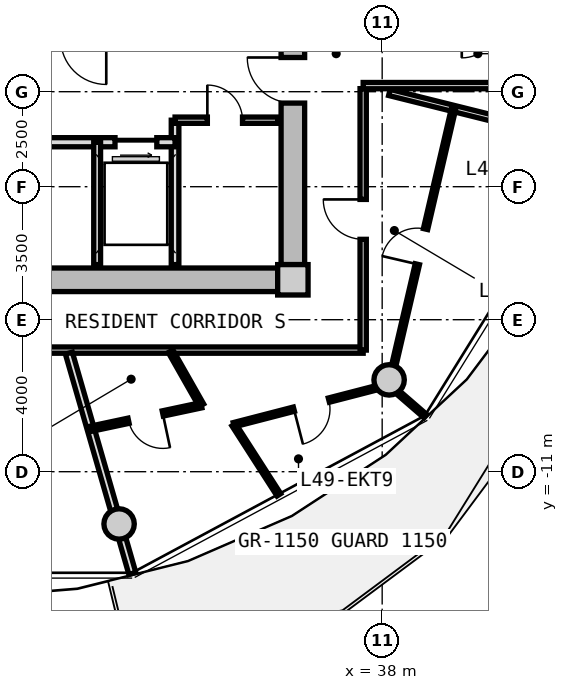
"""IFC4 building model, lengths in metres.
Left out: names, types, materials, properties, quantities, classifications, styles, units other than length and angle.
Written with IfcOpenShell. Run it as: python <this file> out.ifc"""

import sys

from ifc_helpers import new_model, si_unit, direction, frame, frame_2d, origin, origin_2d, place, context, subcontext, project, spatial, rectangle, circle, extrude, source, transform, mapped, element, fill, save


model = new_model("IFC4")
c1 = context("Model", 3, precision=1e-05, world=origin(), true_north=direction((0.0, 1.0)))
c2 = subcontext(c1, "Body", "Model", "MODEL_VIEW")
j1 = project(units=[si_unit("LENGTHUNIT", "METRE"), si_unit("PLANEANGLEUNIT", "RADIAN")], contexts=[c1])
p1 = place(None, origin())
s1 = spatial("IfcSite", under=j1, at=p1, CompositionType="ELEMENT")
p2 = place(p1, origin())
s2 = spatial("IfcBuilding", under=s1, at=p2, CompositionType="ELEMENT")
p3 = place(p2, frame((0.0, 0.0, 158.7)))
s3 = spatial("IfcBuildingStorey", under=s2, at=p3, CompositionType="ELEMENT", Elevation=158.7)
m1 = source(origin(), c2, "Body", "SweptSolid", [
    extrude(rectangle(XDim=0.8, YDim=0.8, at=origin_2d()), origin(), (0.0, 0.0, 1.0), 3.05),
])
p4 = place(p3, frame((35.65, -5.95, 0.0), z_axis=(0.0, 0.0, 1.0), x_axis=(1.0, 0.0, 0.0)))
e1 = element("IfcColumn", 1, at=p4, inside=s3, PredefinedType="COLUMN", context=c2, shape_type="MappedRepresentation", body=[
    mapped(m1, transform((0.0, 0.0, 0.0), x_axis=(1.0, 0.0, 0.0), y_axis=(0.0, 1.0, 0.0), z_axis=(0.0, 0.0, 1.0), scale=1.0)),
])
m2 = source(origin(), c2, "Body", "SweptSolid", [
    extrude(rectangle(XDim=14.5, YDim=0.62, at=frame_2d((7.25, 0.0))), origin(), (0.0, 0.0, 1.0), 2.81),
])
p5 = place(p3, frame((35.25, -5.95, 0.0), z_axis=(0.0, 0.0, 1.0), x_axis=(-1.0, 0.0, 0.0)))
e2 = element("IfcWall", 2, at=p5, inside=s3, PredefinedType="SHEAR", context=c2, shape_type="MappedRepresentation", body=[
    mapped(m2, transform((0.0, 0.0, 0.0), x_axis=(1.0, 0.0, 0.0), y_axis=(0.0, 1.0, 0.0), z_axis=(0.0, 0.0, 1.0), scale=1.0)),
])
m3 = source(origin(), c2, "Body", "SweptSolid", [
    extrude(rectangle(XDim=11.1, YDim=0.62, at=frame_2d((5.55, 0.0))), origin(), (0.0, 0.0, 1.0), 2.81),
])
p6 = place(p3, frame((35.65, 5.55, 0.0), z_axis=(0.0, 0.0, 1.0), x_axis=(0.0, -1.0, 0.0)))
e3 = element("IfcWall", 3, at=p6, inside=s3, PredefinedType="SHEAR", context=c2, shape_type="MappedRepresentation", body=[
    mapped(m3, transform((0.0, 0.0, 0.0), x_axis=(1.0, 0.0, 0.0), y_axis=(0.0, 1.0, 0.0), z_axis=(0.0, 0.0, 1.0), scale=1.0)),
])
p7 = place(p6, frame((5.65, 0.0, 0.0)))
e4 = element("IfcOpeningElement", 4, at=p7, cuts=e3, PredefinedType="OPENING", context=c2, shape_type="SweptSolid", body=[
    extrude(rectangle(XDim=1.2, YDim=2.15, at=frame_2d((0.6, 1.075))), frame((0.0, 0.32, 0.0), z_axis=(0.0, -1.0, 0.0), x_axis=(1.0, 0.0, 0.0)), (0.0, 0.0, 1.0), 0.64),
])
m4 = source(origin(), c2, "Body", "SweptSolid", [
    extrude(circle(Radius=0.4, at=origin_2d()), origin(), (0.0, 0.0, 1.0), 3.05),
])
for number, where, z_axis, x_axis in (
    (5, (31.077, -12.375, 0.0), (0.0, 0.0, 1.0), (1.0, 0.0, 0.0)),
    (6, (38.183, -8.584, 0.0), (0.0, 0.0, 1.0), (1.0, 0.0, 0.0)),
):
    element("IfcColumn", number, at=place(p3, frame(where, z_axis=z_axis, x_axis=x_axis)), inside=s3, PredefinedType="COLUMN", context=c2, shape_type="MappedRepresentation", body=[
        mapped(m4, transform((0.0, 0.0, 0.0), x_axis=(1.0, 0.0, 0.0), y_axis=(0.0, 1.0, 0.0), z_axis=(0.0, 0.0, 1.0), scale=1.0)),
    ])
m5 = source(origin(), c2, "Body", "SweptSolid", [
    extrude(rectangle(XDim=3.8, YDim=0.2, at=frame_2d((1.9, 0.0))), origin(), (0.0, 0.0, 1.0), 2.795),
])
p8 = place(p3, frame((32.55, -5.55, 0.0), z_axis=(0.0, 0.0, 1.0), x_axis=(0.0, 1.0, 0.0)))
e7 = element("IfcWall", 7, at=p8, inside=s3, PredefinedType="PARTITIONING", context=c2, shape_type="MappedRepresentation", body=[
    mapped(m5, transform((0.0, 0.0, 0.0), x_axis=(1.0, 0.0, 0.0), y_axis=(0.0, 1.0, 0.0), z_axis=(0.0, 0.0, 1.0), scale=1.0)),
])
m6 = source(origin(), c2, "Body", "SweptSolid", [
    extrude(rectangle(XDim=4.13, YDim=0.24, at=frame_2d((2.065, 0.0))), origin(), (0.0, 0.0, 1.0), 2.795),
])
p9 = place(p3, frame((28.42, -2.33, 0.0), z_axis=(0.0, 0.0, 1.0), x_axis=(1.0, 0.0, 0.0)))
e8 = element("IfcWall", 8, at=p9, inside=s3, PredefinedType="PARTITIONING", context=c2, shape_type="MappedRepresentation", body=[
    mapped(m6, transform((0.0, 0.0, 0.0), x_axis=(1.0, 0.0, 0.0), y_axis=(0.0, 1.0, 0.0), z_axis=(0.0, 0.0, 1.0), scale=1.0)),
])
p10 = place(p9, frame((2.55, 0.0, 0.0)))
e9 = element("IfcOpeningElement", 9, at=p10, cuts=e8, PredefinedType="OPENING", context=c2, shape_type="SweptSolid", body=[
    extrude(rectangle(XDim=1.1, YDim=2.2, at=frame_2d((0.55, 1.1))), frame((0.0, 0.13, 0.0), z_axis=(0.0, -1.0, 0.0), x_axis=(1.0, 0.0, 0.0)), (0.0, 0.0, 1.0), 0.26),
])
m7 = source(origin(), c2, "Body", "SweptSolid", [
    extrude(rectangle(XDim=3.22, YDim=0.18, at=frame_2d((1.61, 0.0))), origin(), (0.0, 0.0, 1.0), 2.795),
])
p11 = place(p3, frame((30.5, -5.55, 0.0), z_axis=(0.0, 0.0, 1.0), x_axis=(0.0, 1.0, 0.0)))
e10 = element("IfcWall", 10, at=p11, inside=s3, PredefinedType="PARTITIONING", context=c2, shape_type="MappedRepresentation", body=[
    mapped(m7, transform((0.0, 0.0, 0.0), x_axis=(1.0, 0.0, 0.0), y_axis=(0.0, 1.0, 0.0), z_axis=(0.0, 0.0, 1.0), scale=1.0)),
])
m8 = source(origin(), c2, "Body", "SweptSolid", [
    extrude(rectangle(XDim=2.7, YDim=0.165, at=frame_2d((1.35, 0.0))), origin(), (0.0, 0.0, 1.0), 2.795),
])
p12 = place(p3, frame((32.55, -1.75, 0.0), z_axis=(0.0, 0.0, 1.0), x_axis=(1.0, 0.0, 0.0)))
e11 = element("IfcWall", 11, at=p12, inside=s3, PredefinedType="PARTITIONING", context=c2, shape_type="MappedRepresentation", body=[
    mapped(m8, transform((0.0, 0.0, 0.0), x_axis=(1.0, 0.0, 0.0), y_axis=(0.0, 1.0, 0.0), z_axis=(0.0, 0.0, 1.0), scale=1.0)),
])
p13 = place(p12, frame((0.85, 0.0, 0.0)))
e12 = element("IfcOpeningElement", 12, at=p13, cuts=e11, PredefinedType="OPENING", context=c2, shape_type="SweptSolid", body=[
    extrude(rectangle(XDim=0.925, YDim=2.1, at=frame_2d((0.462, 1.05))), frame((0.0, 0.093, 0.0), z_axis=(0.0, -1.0, 0.0), x_axis=(1.0, 0.0, 0.0)), (0.0, 0.0, 1.0), 0.185),
])
m9 = source(origin(), c2, "Body", "SweptSolid", [
    extrude(rectangle(XDim=19.0, YDim=0.165, at=frame_2d((9.5, 0.0))), origin(), (0.0, 0.0, 1.0), 2.795),
])
p14 = place(p3, frame((37.5, -7.8, 0.0), z_axis=(0.0, 0.0, 1.0), x_axis=(-1.0, 0.0, 0.0)))
e13 = element("IfcWall", 13, at=p14, inside=s3, PredefinedType="PARTITIONING", context=c2, shape_type="MappedRepresentation", body=[
    mapped(m9, transform((0.0, 0.0, 0.0), x_axis=(1.0, 0.0, 0.0), y_axis=(0.0, 1.0, 0.0), z_axis=(0.0, 0.0, 1.0), scale=1.0)),
])
p15 = place(p14, frame((12.623, 0.0, 0.0)))
e14 = element("IfcOpeningElement", 14, at=p15, cuts=e13, PredefinedType="OPENING", context=c2, shape_type="SweptSolid", body=[
    extrude(rectangle(XDim=1.25, YDim=2.2, at=frame_2d((0.625, 1.1))), frame((0.0, 0.093, 0.0), z_axis=(0.0, -1.0, 0.0), x_axis=(1.0, 0.0, 0.0)), (0.0, 0.0, 1.0), 0.185),
])
m10 = source(origin(), c2, "Body", "SweptSolid", [
    extrude(rectangle(XDim=6.88, YDim=0.165, at=frame_2d((3.44, 0.0))), origin(), (0.0, 0.0, 1.0), 2.795),
])
p16 = place(p3, frame((37.5, -0.92, 0.0), z_axis=(0.0, 0.0, 1.0), x_axis=(0.0, -1.0, 0.0)))
e15 = element("IfcWall", 15, at=p16, inside=s3, PredefinedType="PARTITIONING", context=c2, shape_type="MappedRepresentation", body=[
    mapped(m10, transform((0.0, 0.0, 0.0), x_axis=(1.0, 0.0, 0.0), y_axis=(0.0, 1.0, 0.0), z_axis=(0.0, 0.0, 1.0), scale=1.0)),
])
p17 = place(p16, frame((2.915, 0.0, 0.0)))
e16 = element("IfcOpeningElement", 16, at=p17, cuts=e15, PredefinedType="OPENING", context=c2, shape_type="SweptSolid", body=[
    extrude(rectangle(XDim=1.05, YDim=2.15, at=frame_2d((0.525, 1.075))), frame((0.0, 0.093, 0.0), z_axis=(0.0, -1.0, 0.0), x_axis=(1.0, 0.0, 0.0)), (0.0, 0.0, 1.0), 0.185),
])
m11 = source(origin(), c2, "Body", "SweptSolid", [
    extrude(rectangle(XDim=5.564, YDim=0.165, at=frame_2d((2.782, 0.0))), origin(), (0.0, 0.0, 1.0), 2.345),
])
p18 = place(p3, frame((38.19, -1.02, 0.0), z_axis=(0.0, 0.0, 1.0), x_axis=(0.97031260977, -0.241854169533, 0.0)))
e17 = element("IfcWall", 17, at=p18, inside=s3, PredefinedType="PARTITIONING", context=c2, shape_type="MappedRepresentation", body=[
    mapped(m11, transform((0.0, 0.0, 0.0), x_axis=(1.0, 0.0, 0.0), y_axis=(0.0, 1.0, 0.0), z_axis=(0.0, 0.0, 1.0), scale=1.0)),
])
m12 = source(origin(), c2, "Body", "SweptSolid", [
    extrude(rectangle(XDim=6.139, YDim=0.165, at=frame_2d((3.069, 0.0))), origin(), (0.0, 0.0, 1.0), 2.795),
])
p19 = place(p3, frame((43.639, -0.84, 0.0), z_axis=(0.0, 0.0, 1.0), x_axis=(-1.0, 0.0, 0.0)))
e18 = element("IfcWall", 18, at=p19, inside=s3, PredefinedType="PARTITIONING", context=c2, shape_type="MappedRepresentation", body=[
    mapped(m12, transform((0.0, 0.0, 0.0), x_axis=(1.0, 0.0, 0.0), y_axis=(0.0, 1.0, 0.0), z_axis=(0.0, 0.0, 1.0), scale=1.0)),
])
m13 = source(origin(), c2, "Body", "SweptSolid", [
    extrude(rectangle(XDim=6.035, YDim=0.19, at=frame_2d((3.018, 0.0))), origin(), (0.0, 0.0, 1.0), 2.345),
])
p20 = place(p3, frame((29.756, -7.88, 0.0), z_axis=(0.0, 0.0, 1.0), x_axis=(0.276809454862, -0.960924828329, 0.0)))
e19 = element("IfcWall", 19, at=p20, inside=s3, PredefinedType="PARTITIONING", context=c2, shape_type="MappedRepresentation", body=[
    mapped(m13, transform((0.0, 0.0, 0.0), x_axis=(1.0, 0.0, 0.0), y_axis=(0.0, 1.0, 0.0), z_axis=(0.0, 0.0, 1.0), scale=1.0)),
])
m14 = source(origin(), c2, "Body", "SweptSolid", [
    extrude(rectangle(XDim=7.469, YDim=0.115, at=frame_2d((3.734, 0.0))), origin(), (0.0, 0.0, 1.0), 2.795),
])
p21 = place(p3, frame((38.187, -8.715, 0.0), z_axis=(0.0, 0.0, 1.0), x_axis=(0.226790420763, 0.973943584121, 0.0)))
e20 = element("IfcWall", 20, at=p21, inside=s3, PredefinedType="PARTITIONING", context=c2, shape_type="MappedRepresentation", body=[
    mapped(m14, transform((0.0, 0.0, 0.0), x_axis=(1.0, 0.0, 0.0), y_axis=(0.0, 1.0, 0.0), z_axis=(0.0, 0.0, 1.0), scale=1.0)),
])
p22 = place(p21, frame((3.259, 0.0, 0.0)))
e21 = element("IfcOpeningElement", 21, at=p22, cuts=e20, PredefinedType="OPENING", context=c2, shape_type="SweptSolid", body=[
    extrude(rectangle(XDim=0.95, YDim=2.1, at=frame_2d((0.475, 1.05))), frame((0.0, 0.067, 0.0), z_axis=(0.0, -1.0, 0.0), x_axis=(1.0, 0.0, 0.0)), (0.0, 0.0, 1.0), 0.135),
])
m15 = source(origin(), c2, "Body", "SweptSolid", [
    extrude(rectangle(XDim=1.258, YDim=0.115, at=frame_2d((0.629, 0.0))), origin(), (0.0, 0.0, 1.0), 2.795),
])
p23 = place(p3, frame((38.187, -8.715, 0.0), z_axis=(0.0, 0.0, 1.0), x_axis=(0.755765923317, -0.654841865761, 0.0)))
e22 = element("IfcWall", 22, at=p23, inside=s3, PredefinedType="PARTITIONING", context=c2, shape_type="MappedRepresentation", body=[
    mapped(m15, transform((0.0, 0.0, 0.0), x_axis=(1.0, 0.0, 0.0), y_axis=(0.0, 1.0, 0.0), z_axis=(0.0, 0.0, 1.0), scale=1.0)),
])
m16 = source(origin(), c2, "Body", "SweptSolid", [
    extrude(rectangle(XDim=1.635, YDim=0.14, at=frame_2d((0.817, 0.0))), origin(), (0.0, 0.0, 1.0), 2.795),
])
p24 = place(p3, frame((32.434, -7.83, 0.0), z_axis=(0.0, 0.0, 1.0), x_axis=(0.494078690764, -0.869417188312, 0.0)))
e23 = element("IfcWall", 23, at=p24, inside=s3, PredefinedType="PARTITIONING", context=c2, shape_type="MappedRepresentation", body=[
    mapped(m16, transform((0.0, 0.0, 0.0), x_axis=(1.0, 0.0, 0.0), y_axis=(0.0, 1.0, 0.0), z_axis=(0.0, 0.0, 1.0), scale=1.0)),
])
m17 = source(origin(), c2, "Body", "SweptSolid", [
    extrude(rectangle(XDim=2.995, YDim=0.14, at=frame_2d((1.498, 0.0))), origin(), (0.0, 0.0, 1.0), 2.435),
])
p25 = place(p3, frame((33.241, -9.251, 0.0), z_axis=(0.0, 0.0, 1.0), x_axis=(-0.978075914325, -0.208248663425, 0.0)))
e24 = element("IfcWall", 24, at=p25, inside=s3, PredefinedType="PARTITIONING", context=c2, shape_type="MappedRepresentation", body=[
    mapped(m17, transform((0.0, 0.0, 0.0), x_axis=(1.0, 0.0, 0.0), y_axis=(0.0, 1.0, 0.0), z_axis=(0.0, 0.0, 1.0), scale=1.0)),
])
p26 = place(p25, frame((1.038, 0.0, 0.0)))
e25 = element("IfcOpeningElement", 25, at=p26, cuts=e24, PredefinedType="OPENING", context=c2, shape_type="SweptSolid", body=[
    extrude(rectangle(XDim=0.92, YDim=2.1, at=frame_2d((0.46, 1.05))), frame((0.0, 0.08, 0.0), z_axis=(0.0, -1.0, 0.0), x_axis=(1.0, 0.0, 0.0)), (0.0, 0.0, 1.0), 0.16),
])
m18 = source(origin(), c2, "Body", "SweptSolid", [
    extrude(rectangle(XDim=2.194, YDim=0.115, at=frame_2d((1.097, 0.0))), origin(), (0.0, 0.0, 1.0), 2.795),
])
p27 = place(p3, frame((34.095, -9.764, 0.0), z_axis=(0.0, 0.0, 1.0), x_axis=(0.540858831194, -0.841113383985, 0.0)))
e26 = element("IfcWall", 26, at=p27, inside=s3, PredefinedType="PARTITIONING", context=c2, shape_type="MappedRepresentation", body=[
    mapped(m18, transform((0.0, 0.0, 0.0), x_axis=(1.0, 0.0, 0.0), y_axis=(0.0, 1.0, 0.0), z_axis=(0.0, 0.0, 1.0), scale=1.0)),
])
m19 = source(origin(), c2, "Body", "SweptSolid", [
    extrude(rectangle(XDim=4.218, YDim=0.115, at=frame_2d((2.109, 0.0))), origin(), (0.0, 0.0, 1.0), 2.345),
])
p28 = place(p3, frame((34.095, -9.764, 0.0), z_axis=(0.0, 0.0, 1.0), x_axis=(0.968124892577, 0.250467946797, 0.0)))
e27 = element("IfcWall", 27, at=p28, inside=s3, PredefinedType="PARTITIONING", context=c2, shape_type="MappedRepresentation", body=[
    mapped(m19, transform((0.0, 0.0, 0.0), x_axis=(1.0, 0.0, 0.0), y_axis=(0.0, 1.0, 0.0), z_axis=(0.0, 0.0, 1.0), scale=1.0)),
])
p29 = place(p28, frame((1.634, 0.0, 0.0)))
e28 = element("IfcOpeningElement", 28, at=p29, cuts=e27, PredefinedType="OPENING", context=c2, shape_type="SweptSolid", body=[
    extrude(rectangle(XDim=0.95, YDim=2.1, at=frame_2d((0.475, 1.05))), frame((0.0, 0.067, 0.0), z_axis=(0.0, -1.0, 0.0), x_axis=(1.0, 0.0, 0.0)), (0.0, 0.0, 1.0), 0.135),
])
m20 = source(origin(), c2, "Body", "SweptSolid", [
    extrude(rectangle(XDim=1.2, YDim=2.15, at=frame_2d((0.6, 1.075))), frame((0.0, 0.025, 0.0), z_axis=(0.0, -1.0, 0.0), x_axis=(1.0, 0.0, 0.0)), (0.0, 0.0, 1.0), 0.05),
])
p30 = place(p7, frame((1.2, 0.0, 0.0), z_axis=(0.0, 0.0, 1.0), x_axis=(-1.0, 0.0, 0.0)))
e29 = element("IfcDoor", 29, at=p30, inside=s3, OperationType="SINGLE_SWING_RIGHT", PredefinedType="DOOR", context=c2, shape_type="MappedRepresentation", body=[
    mapped(m20, transform((0.0, 0.0, 0.0), x_axis=(1.0, 0.0, 0.0), y_axis=(0.0, 1.0, 0.0), z_axis=(0.0, 0.0, 1.0), scale=1.0)),
])
fill(e4, e29)
m21 = source(origin(), c2, "Body", "SweptSolid", [
    extrude(rectangle(XDim=1.1, YDim=2.2, at=frame_2d((0.55, 1.1))), frame((0.0, 0.025, 0.0), z_axis=(0.0, -1.0, 0.0), x_axis=(1.0, 0.0, 0.0)), (0.0, 0.0, 1.0), 0.05),
])
p31 = place(p10, frame((1.1, 0.0, 0.0), z_axis=(0.0, 0.0, 1.0), x_axis=(-1.0, 0.0, 0.0)))
e30 = element("IfcDoor", 30, at=p31, inside=s3, OperationType="SLIDING_TO_RIGHT", PredefinedType="DOOR", context=c2, shape_type="MappedRepresentation", body=[
    mapped(m21, transform((0.0, 0.0, 0.0), x_axis=(1.0, 0.0, 0.0), y_axis=(0.0, 1.0, 0.0), z_axis=(0.0, 0.0, 1.0), scale=1.0)),
])
fill(e9, e30)
m22 = source(origin(), c2, "Body", "SweptSolid", [
    extrude(rectangle(XDim=0.925, YDim=2.1, at=frame_2d((0.462, 1.05))), frame((0.0, 0.025, 0.0), z_axis=(0.0, -1.0, 0.0), x_axis=(1.0, 0.0, 0.0)), (0.0, 0.0, 1.0), 0.05),
])
p32 = place(p13, origin())
e31 = element("IfcDoor", 31, at=p32, inside=s3, OperationType="SINGLE_SWING_LEFT", PredefinedType="DOOR", context=c2, shape_type="MappedRepresentation", body=[
    mapped(m22, transform((0.0, 0.0, 0.0), x_axis=(1.0, 0.0, 0.0), y_axis=(0.0, 1.0, 0.0), z_axis=(0.0, 0.0, 1.0), scale=1.0)),
])
fill(e12, e31)
m23 = source(origin(), c2, "Body", "SweptSolid", [
    extrude(rectangle(XDim=1.05, YDim=2.15, at=frame_2d((0.525, 1.075))), frame((0.0, 0.025, 0.0), z_axis=(0.0, -1.0, 0.0), x_axis=(1.0, 0.0, 0.0)), (0.0, 0.0, 1.0), 0.05),
])
p33 = place(p17, frame((1.05, 0.0, 0.0), z_axis=(0.0, 0.0, 1.0), x_axis=(-1.0, 0.0, 0.0)))
e32 = element("IfcDoor", 32, at=p33, inside=s3, OperationType="SINGLE_SWING_RIGHT", PredefinedType="DOOR", context=c2, shape_type="MappedRepresentation", body=[
    mapped(m23, transform((0.0, 0.0, 0.0), x_axis=(1.0, 0.0, 0.0), y_axis=(0.0, 1.0, 0.0), z_axis=(0.0, 0.0, 1.0), scale=1.0)),
])
fill(e16, e32)
m24 = source(origin(), c2, "Body", "SweptSolid", [
    extrude(rectangle(XDim=0.92, YDim=2.1, at=frame_2d((0.46, 1.05))), frame((0.0, 0.025, 0.0), z_axis=(0.0, -1.0, 0.0), x_axis=(1.0, 0.0, 0.0)), (0.0, 0.0, 1.0), 0.05),
])
p34 = place(p26, origin())
e33 = element("IfcDoor", 33, at=p34, inside=s3, OperationType="SINGLE_SWING_LEFT", PredefinedType="DOOR", context=c2, shape_type="MappedRepresentation", body=[
    mapped(m24, transform((0.0, 0.0, 0.0), x_axis=(1.0, 0.0, 0.0), y_axis=(0.0, 1.0, 0.0), z_axis=(0.0, 0.0, 1.0), scale=1.0)),
])
fill(e25, e33)
m25 = source(origin(), c2, "Body", "SweptSolid", [
    extrude(rectangle(XDim=0.95, YDim=2.1, at=frame_2d((0.475, 1.05))), frame((0.0, 0.025, 0.0), z_axis=(0.0, -1.0, 0.0), x_axis=(1.0, 0.0, 0.0)), (0.0, 0.0, 1.0), 0.05),
])
p35 = place(p29, frame((0.95, 0.0, 0.0), z_axis=(0.0, 0.0, 1.0), x_axis=(-1.0, 0.0, 0.0)))
e34 = element("IfcDoor", 34, at=p35, inside=s3, OperationType="SINGLE_SWING_RIGHT", PredefinedType="DOOR", context=c2, shape_type="MappedRepresentation", body=[
    mapped(m25, transform((0.0, 0.0, 0.0), x_axis=(1.0, 0.0, 0.0), y_axis=(0.0, 1.0, 0.0), z_axis=(0.0, 0.0, 1.0), scale=1.0)),
])
fill(e28, e34)
p36 = place(p22, origin())
e35 = element("IfcDoor", 35, at=p36, inside=s3, OperationType="SINGLE_SWING_LEFT", PredefinedType="DOOR", context=c2, shape_type="MappedRepresentation", body=[
    mapped(m25, transform((0.0, 0.0, 0.0), x_axis=(1.0, 0.0, 0.0), y_axis=(0.0, 1.0, 0.0), z_axis=(0.0, 0.0, 1.0), scale=1.0)),
])
fill(e21, e35)
save(model, sys.argv[1])
